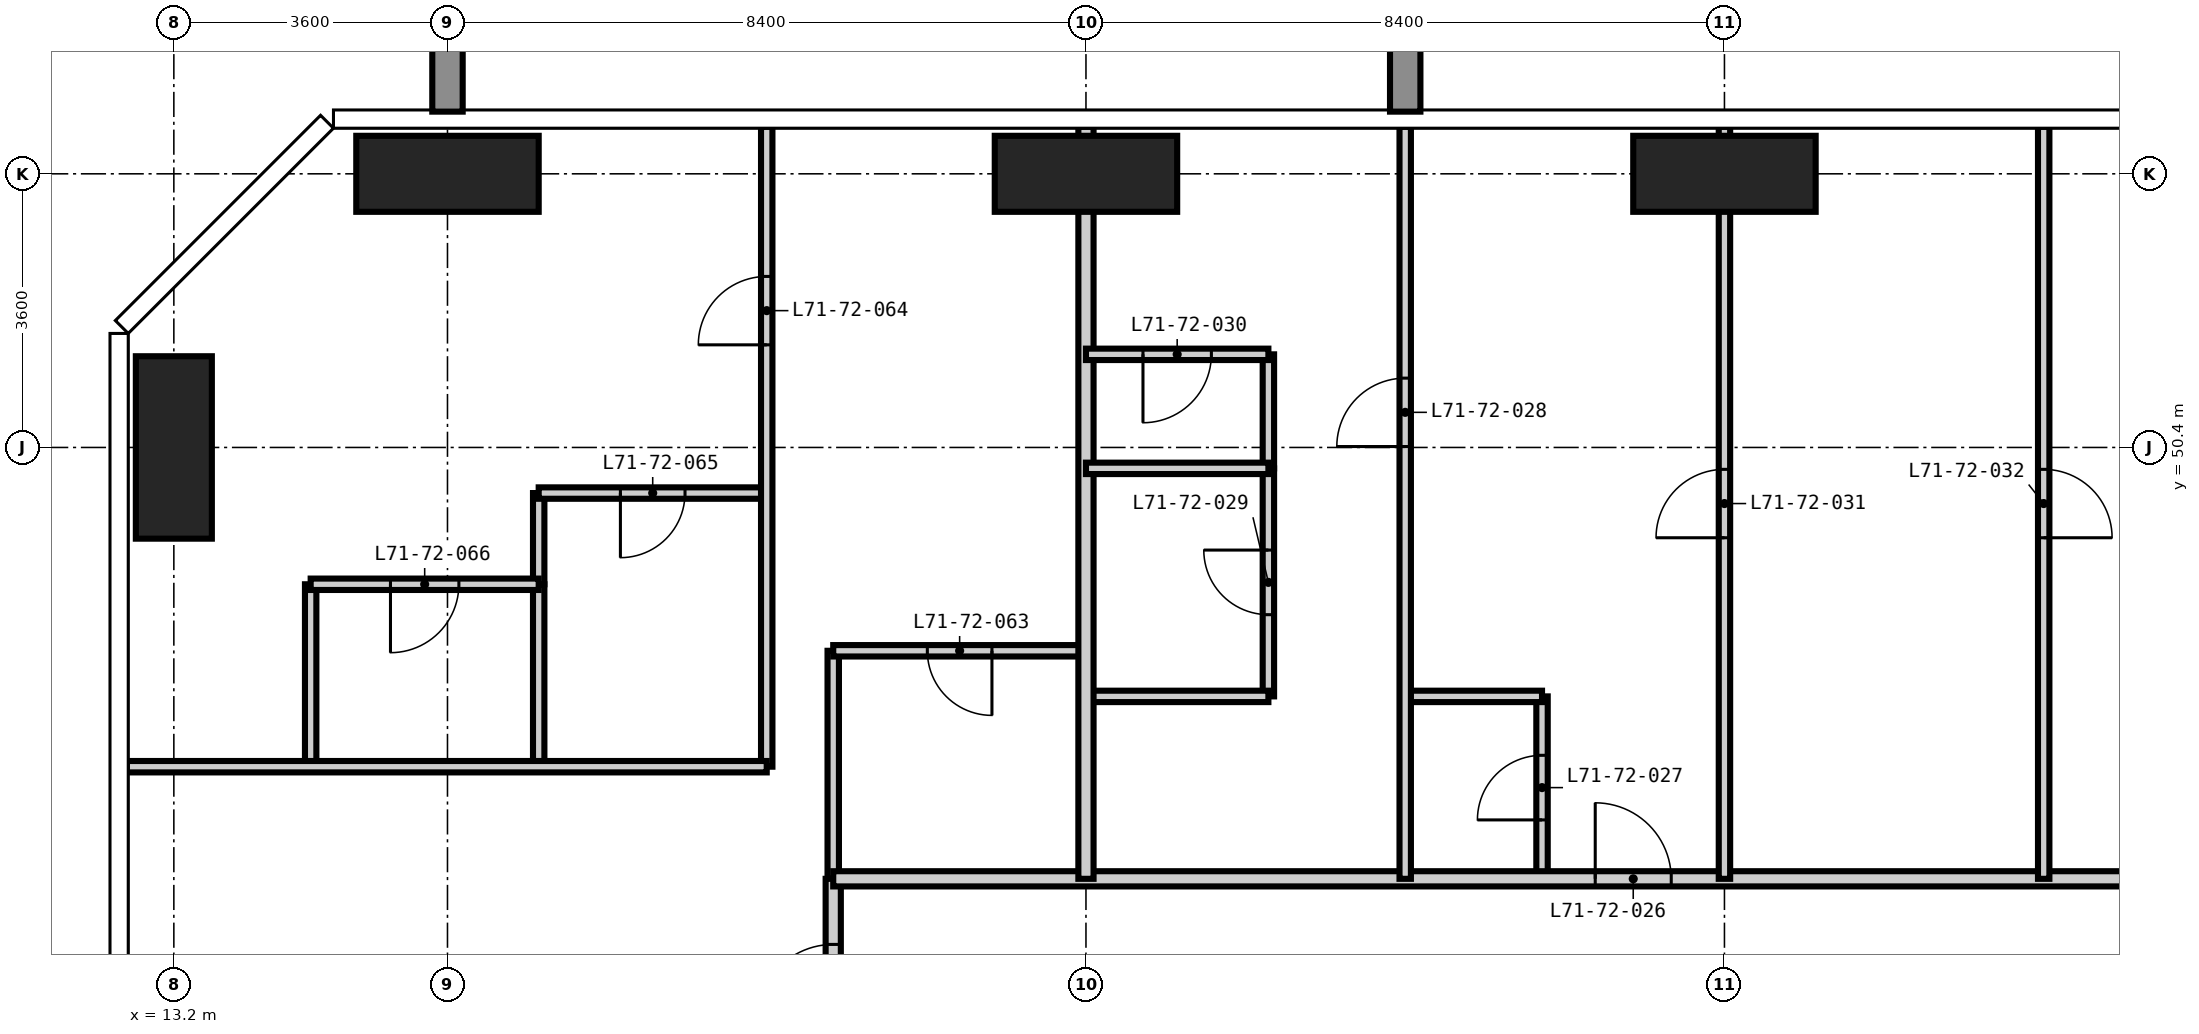
"""IFC4 building model, lengths in metres.
Left out: names, types, materials, properties, quantities, classifications, styles, units other than length and angle.
Written with IfcOpenShell. Run it as: python <this file> out.ifc"""

import sys

from ifc_helpers import new_model, si_unit, direction, frame, frame_2d, origin, origin_2d, place, context, subcontext, project, spatial, rectangle, extrude, element, fill, save


model = new_model("IFC4")
c1 = context("Model", 3, precision=1e-05, world=origin(), true_north=direction((0.0, 1.0)))
c2 = subcontext(c1, "Body", "Model", "MODEL_VIEW")
j1 = project(units=[si_unit("LENGTHUNIT", "METRE"), si_unit("PLANEANGLEUNIT", "RADIAN")], contexts=[c1])
p1 = place(None, origin())
s1 = spatial("IfcSite", under=j1, at=p1, CompositionType="ELEMENT")
p2 = place(p1, origin())
s2 = spatial("IfcBuilding", under=s1, at=p2, CompositionType="ELEMENT")
p3 = place(p2, frame((0.0, 0.0, 276.3)))
s3 = spatial("IfcBuildingStorey", under=s2, at=p3, CompositionType="ELEMENT", Elevation=276.3)
p4 = place(p3, frame((13.2, 50.4, -0.35), z_axis=(0.0, 0.0, 1.0), x_axis=(1.0, 0.0, 0.0)))
e1 = element("IfcColumn", 1, at=p4, inside=s3, PredefinedType="COLUMN", context=c2, shape_type="SweptSolid", body=[
    extrude(rectangle(XDim=1.0, YDim=2.4, at=origin_2d()), origin(), (0.0, 0.0, 1.0), 3.9),
])
for number, where, z_axis, x_axis in (
    (2, (16.8, 54.0, -0.35), (0.0, 0.0, 1.0), (1.0, 0.0, 0.0)),
    (3, (25.2, 54.0, -0.35), (0.0, 0.0, 1.0), (1.0, 0.0, 0.0)),
    (4, (33.6, 54.0, -0.35), (0.0, 0.0, 1.0), (1.0, 0.0, 0.0)),
):
    element("IfcColumn", number, at=place(p3, frame(where, z_axis=z_axis, x_axis=x_axis)), inside=s3, PredefinedType="COLUMN", context=c2, shape_type="SweptSolid", body=[
        extrude(rectangle(XDim=2.4, YDim=1.0, at=origin_2d()), origin(), (0.0, 0.0, 1.0), 3.9),
    ])
p5 = place(p3, frame((18.0, 48.6, 0.0), z_axis=(0.0, 0.0, 1.0), x_axis=(0.0, 1.0, 0.0)))
e5 = element("IfcWall", 5, at=p5, inside=s3, PredefinedType="PARTITIONING", context=c2, shape_type="SweptSolid", body=[
    extrude(rectangle(XDim=1.2, YDim=0.15, at=frame_2d((0.6, 0.0))), origin(), (0.0, 0.0, 1.0), 3.55),
])
p6 = place(p3, frame((21.875, 44.725, 0.0), z_axis=(0.0, 0.0, 1.0), x_axis=(0.0, 1.0, 0.0)))
e6 = element("IfcWall", 6, at=p6, inside=s3, PredefinedType="PARTITIONING", context=c2, shape_type="SweptSolid", body=[
    extrude(rectangle(XDim=3.0, YDim=0.15, at=frame_2d((1.5, 0.0))), origin(), (0.0, 0.0, 1.0), 3.55),
])
p7 = place(p3, frame((27.6, 47.125, 0.0), z_axis=(0.0, 0.0, 1.0), x_axis=(0.0, 1.0, 0.0)))
e7 = element("IfcWall", 7, at=p7, inside=s3, PredefinedType="PARTITIONING", context=c2, shape_type="SweptSolid", body=[
    extrude(rectangle(XDim=3.0, YDim=0.15, at=frame_2d((1.5, 0.0))), origin(), (0.0, 0.0, 1.0), 3.55),
])
p8 = place(p7, frame((1.075, 0.0, 0.0)))
e8 = element("IfcOpeningElement", 8, at=p8, cuts=e7, PredefinedType="OPENING", context=c2, shape_type="SweptSolid", body=[
    extrude(rectangle(XDim=0.85, YDim=2.1, at=frame_2d((0.425, 1.05))), frame((0.0, 0.085, 0.0), z_axis=(0.0, -1.0, 0.0), x_axis=(1.0, 0.0, 0.0)), (0.0, 0.0, 1.0), 0.17),
])
p9 = place(p3, frame((31.2, 44.725, 0.0), z_axis=(0.0, 0.0, 1.0), x_axis=(0.0, 1.0, 0.0)))
e9 = element("IfcWall", 9, at=p9, inside=s3, PredefinedType="PARTITIONING", context=c2, shape_type="SweptSolid", body=[
    extrude(rectangle(XDim=2.4, YDim=0.15, at=frame_2d((1.2, 0.0))), origin(), (0.0, 0.0, 1.0), 3.55),
])
p10 = place(p9, frame((0.775, 0.0, 0.0)))
e10 = element("IfcOpeningElement", 10, at=p10, cuts=e9, PredefinedType="OPENING", context=c2, shape_type="SweptSolid", body=[
    extrude(rectangle(XDim=0.85, YDim=2.1, at=frame_2d((0.425, 1.05))), frame((0.0, 0.085, 0.0), z_axis=(0.0, -1.0, 0.0), x_axis=(1.0, 0.0, 0.0)), (0.0, 0.0, 1.0), 0.17),
])
p11 = place(p3, frame((25.2, 47.125, 0.0), z_axis=(0.0, 0.0, 1.0), x_axis=(1.0, 0.0, 0.0)))
e11 = element("IfcWall", 11, at=p11, inside=s3, PredefinedType="PARTITIONING", context=c2, shape_type="SweptSolid", body=[
    extrude(rectangle(XDim=2.4, YDim=0.15, at=frame_2d((1.2, 0.0))), origin(), (0.0, 0.0, 1.0), 3.55),
])
p12 = place(p3, frame((29.4, 47.125, 0.0), z_axis=(0.0, 0.0, 1.0), x_axis=(1.0, 0.0, 0.0)))
e12 = element("IfcWall", 12, at=p12, inside=s3, PredefinedType="PARTITIONING", context=c2, shape_type="SweptSolid", body=[
    extrude(rectangle(XDim=1.8, YDim=0.15, at=frame_2d((0.9, 0.0))), origin(), (0.0, 0.0, 1.0), 3.55),
])
p13 = place(p3, frame((21.875, 47.725, 0.0), z_axis=(0.0, 0.0, 1.0), x_axis=(1.0, 0.0, 0.0)))
e13 = element("IfcWall", 13, at=p13, inside=s3, PredefinedType="PARTITIONING", context=c2, shape_type="SweptSolid", body=[
    extrude(rectangle(XDim=3.325, YDim=0.15, at=frame_2d((1.663, 0.0))), origin(), (0.0, 0.0, 1.0), 3.55),
])
p14 = place(p13, frame((1.238, 0.0, 0.0)))
e14 = element("IfcOpeningElement", 14, at=p14, cuts=e13, PredefinedType="OPENING", context=c2, shape_type="SweptSolid", body=[
    extrude(rectangle(XDim=0.85, YDim=2.1, at=frame_2d((0.425, 1.05))), frame((0.0, 0.085, 0.0), z_axis=(0.0, -1.0, 0.0), x_axis=(1.0, 0.0, 0.0)), (0.0, 0.0, 1.0), 0.17),
])
p15 = place(p3, frame((18.0, 49.8, 0.0), z_axis=(0.0, 0.0, 1.0), x_axis=(1.0, 0.0, 0.0)))
e15 = element("IfcWall", 15, at=p15, inside=s3, PredefinedType="PARTITIONING", context=c2, shape_type="SweptSolid", body=[
    extrude(rectangle(XDim=3.0, YDim=0.15, at=frame_2d((1.5, 0.0))), origin(), (0.0, 0.0, 1.0), 3.55),
])
p16 = place(p15, frame((1.075, 0.0, 0.0)))
e16 = element("IfcOpeningElement", 16, at=p16, cuts=e15, PredefinedType="OPENING", context=c2, shape_type="SweptSolid", body=[
    extrude(rectangle(XDim=0.85, YDim=2.1, at=frame_2d((0.425, 1.05))), frame((0.0, 0.085, 0.0), z_axis=(0.0, -1.0, 0.0), x_axis=(1.0, 0.0, 0.0)), (0.0, 0.0, 1.0), 0.17),
])
p17 = place(p3, frame((21.875, 13.475, 0.0), z_axis=(0.0, 0.0, 1.0), x_axis=(0.0, 1.0, 0.0)))
e17 = element("IfcWall", 17, at=p17, inside=s3, PredefinedType="PARTITIONING", context=c2, shape_type="SweptSolid", body=[
    extrude(rectangle(XDim=31.25, YDim=0.2, at=frame_2d((15.625, 0.0))), origin(), (0.0, 0.0, 1.0), 3.55),
])
p18 = place(p17, frame((4.925, 0.0, 0.0)))
e18 = element("IfcOpeningElement", 18, at=p18, cuts=e17, PredefinedType="OPENING", context=c2, shape_type="SweptSolid", body=[
    extrude(rectangle(XDim=1.0, YDim=2.2, at=frame_2d((0.5, 1.1))), frame((0.0, 0.11, 0.0), z_axis=(0.0, -1.0, 0.0), x_axis=(1.0, 0.0, 0.0)), (0.0, 0.0, 1.0), 0.22),
])
p19 = place(p17, frame((11.225, 0.0, 0.0)))
e19 = element("IfcOpeningElement", 19, at=p19, cuts=e17, PredefinedType="OPENING", context=c2, shape_type="SweptSolid", body=[
    extrude(rectangle(XDim=1.0, YDim=2.2, at=frame_2d((0.5, 1.1))), frame((0.0, 0.11, 0.0), z_axis=(0.0, -1.0, 0.0), x_axis=(1.0, 0.0, 0.0)), (0.0, 0.0, 1.0), 0.22),
])
p20 = place(p17, frame((19.625, 0.0, 0.0)))
e20 = element("IfcOpeningElement", 20, at=p20, cuts=e17, PredefinedType="OPENING", context=c2, shape_type="SweptSolid", body=[
    extrude(rectangle(XDim=1.0, YDim=2.2, at=frame_2d((0.5, 1.1))), frame((0.0, 0.11, 0.0), z_axis=(0.0, -1.0, 0.0), x_axis=(1.0, 0.0, 0.0)), (0.0, 0.0, 1.0), 0.22),
])
p21 = place(p17, frame((25.925, 0.0, 0.0)))
e21 = element("IfcOpeningElement", 21, at=p21, cuts=e17, PredefinedType="OPENING", context=c2, shape_type="SweptSolid", body=[
    extrude(rectangle(XDim=1.0, YDim=2.2, at=frame_2d((0.5, 1.1))), frame((0.0, 0.11, 0.0), z_axis=(0.0, -1.0, 0.0), x_axis=(1.0, 0.0, 0.0)), (0.0, 0.0, 1.0), 0.22),
])
p22 = place(p17, frame((1.162, 0.0, 0.0)))
e22 = element("IfcOpeningElement", 22, at=p22, cuts=e17, PredefinedType="OPENING", context=c2, shape_type="SweptSolid", body=[
    extrude(rectangle(XDim=1.0, YDim=2.2, at=frame_2d((0.5, 1.1))), frame((0.0, 0.11, 0.0), z_axis=(0.0, -1.0, 0.0), x_axis=(1.0, 0.0, 0.0)), (0.0, 0.0, 1.0), 0.22),
])
p23 = place(p17, frame((29.387, 0.0, 0.0)))
e23 = element("IfcOpeningElement", 23, at=p23, cuts=e17, PredefinedType="OPENING", context=c2, shape_type="SweptSolid", body=[
    extrude(rectangle(XDim=1.0, YDim=2.2, at=frame_2d((0.5, 1.1))), frame((0.0, 0.11, 0.0), z_axis=(0.0, -1.0, 0.0), x_axis=(1.0, 0.0, 0.0)), (0.0, 0.0, 1.0), 0.22),
])
p24 = place(p3, frame((21.875, 44.725, 0.0), z_axis=(0.0, 0.0, 1.0), x_axis=(1.0, 0.0, 0.0)))
e24 = element("IfcWall", 24, at=p24, inside=s3, PredefinedType="PARTITIONING", context=c2, shape_type="SweptSolid", body=[
    extrude(rectangle(XDim=22.25, YDim=0.2, at=frame_2d((11.125, 0.0))), origin(), (0.0, 0.0, 1.0), 3.55),
])
p25 = place(p24, frame((10.025, 0.0, 0.0)))
e25 = element("IfcOpeningElement", 25, at=p25, cuts=e24, PredefinedType="OPENING", context=c2, shape_type="SweptSolid", body=[
    extrude(rectangle(XDim=1.0, YDim=2.2, at=frame_2d((0.5, 1.1))), frame((0.0, 0.11, 0.0), z_axis=(0.0, -1.0, 0.0), x_axis=(1.0, 0.0, 0.0)), (0.0, 0.0, 1.0), 0.22),
])
p26 = place(p3, frame((25.2, 44.725, 0.0), z_axis=(0.0, 0.0, 1.0), x_axis=(0.0, 1.0, 0.0)))
e26 = element("IfcWall", 26, at=p26, inside=s3, PredefinedType="PARTITIONING", context=c2, shape_type="SweptSolid", body=[
    extrude(rectangle(XDim=9.893, YDim=0.2, at=frame_2d((4.946, 0.0))), origin(), (0.0, 0.0, 1.0), 3.55),
])
for number, where, z_axis, x_axis in (
    (27, (15.0, 46.2, 0.0), (0.0, 0.0, 1.0), (0.0, 1.0, 0.0)),
    (28, (18.0, 46.2, 0.0), (0.0, 0.0, 1.0), (0.0, 1.0, 0.0)),
):
    element("IfcWall", number, at=place(p3, frame(where, z_axis=z_axis, x_axis=x_axis)), inside=s3, PredefinedType="PARTITIONING", context=c2, shape_type="SweptSolid", body=[
        extrude(rectangle(XDim=2.4, YDim=0.15, at=frame_2d((1.2, 0.0))), origin(), (0.0, 0.0, 1.0), 3.55),
    ])
p27 = place(p3, frame((21.0, 46.2, 0.0), z_axis=(0.0, 0.0, 1.0), x_axis=(0.0, 1.0, 0.0)))
e29 = element("IfcWall", 29, at=p27, inside=s3, PredefinedType="PARTITIONING", context=c2, shape_type="SweptSolid", body=[
    extrude(rectangle(XDim=8.418, YDim=0.15, at=frame_2d((4.209, 0.0))), origin(), (0.0, 0.0, 1.0), 3.55),
])
p28 = place(p27, frame((5.55, 0.0, 0.0)))
e30 = element("IfcOpeningElement", 30, at=p28, cuts=e29, PredefinedType="OPENING", context=c2, shape_type="SweptSolid", body=[
    extrude(rectangle(XDim=0.9, YDim=2.1, at=frame_2d((0.45, 1.05))), frame((0.0, 0.085, 0.0), z_axis=(0.0, -1.0, 0.0), x_axis=(1.0, 0.0, 0.0)), (0.0, 0.0, 1.0), 0.17),
])
p29 = place(p3, frame((27.6, 50.125, 0.0), z_axis=(0.0, 0.0, 1.0), x_axis=(0.0, 1.0, 0.0)))
e31 = element("IfcWall", 31, at=p29, inside=s3, PredefinedType="PARTITIONING", context=c2, shape_type="SweptSolid", body=[
    extrude(rectangle(XDim=1.5, YDim=0.15, at=frame_2d((0.75, 0.0))), origin(), (0.0, 0.0, 1.0), 3.55),
])
p30 = place(p3, frame((29.4, 44.725, 0.0), z_axis=(0.0, 0.0, 1.0), x_axis=(0.0, 1.0, 0.0)))
e32 = element("IfcWall", 32, at=p30, inside=s3, PredefinedType="PARTITIONING", context=c2, shape_type="SweptSolid", body=[
    extrude(rectangle(XDim=9.893, YDim=0.15, at=frame_2d((4.946, 0.0))), origin(), (0.0, 0.0, 1.0), 3.55),
])
p31 = place(p30, frame((5.687, 0.0, 0.0)))
e33 = element("IfcOpeningElement", 33, at=p31, cuts=e32, PredefinedType="OPENING", context=c2, shape_type="SweptSolid", body=[
    extrude(rectangle(XDim=0.9, YDim=2.1, at=frame_2d((0.45, 1.05))), frame((0.0, 0.085, 0.0), z_axis=(0.0, -1.0, 0.0), x_axis=(1.0, 0.0, 0.0)), (0.0, 0.0, 1.0), 0.17),
])
p32 = place(p3, frame((33.6, 44.725, 0.0), z_axis=(0.0, 0.0, 1.0), x_axis=(0.0, 1.0, 0.0)))
e34 = element("IfcWall", 34, at=p32, inside=s3, PredefinedType="PARTITIONING", context=c2, shape_type="SweptSolid", body=[
    extrude(rectangle(XDim=9.893, YDim=0.15, at=frame_2d((4.946, 0.0))), origin(), (0.0, 0.0, 1.0), 3.55),
])
p33 = place(p32, frame((4.487, 0.0, 0.0)))
e35 = element("IfcOpeningElement", 35, at=p33, cuts=e34, PredefinedType="OPENING", context=c2, shape_type="SweptSolid", body=[
    extrude(rectangle(XDim=0.9, YDim=2.1, at=frame_2d((0.45, 1.05))), frame((0.0, 0.085, 0.0), z_axis=(0.0, -1.0, 0.0), x_axis=(1.0, 0.0, 0.0)), (0.0, 0.0, 1.0), 0.17),
])
p34 = place(p3, frame((37.8, 44.725, 0.0), z_axis=(0.0, 0.0, 1.0), x_axis=(0.0, 1.0, 0.0)))
e36 = element("IfcWall", 36, at=p34, inside=s3, PredefinedType="PARTITIONING", context=c2, shape_type="SweptSolid", body=[
    extrude(rectangle(XDim=9.893, YDim=0.15, at=frame_2d((4.946, 0.0))), origin(), (0.0, 0.0, 1.0), 3.55),
])
p35 = place(p34, frame((4.487, 0.0, 0.0)))
e37 = element("IfcOpeningElement", 37, at=p35, cuts=e36, PredefinedType="OPENING", context=c2, shape_type="SweptSolid", body=[
    extrude(rectangle(XDim=0.9, YDim=2.1, at=frame_2d((0.45, 1.05))), frame((0.0, 0.085, 0.0), z_axis=(0.0, -1.0, 0.0), x_axis=(1.0, 0.0, 0.0)), (0.0, 0.0, 1.0), 0.17),
])
p36 = place(p3, frame((12.582, 46.2, 0.0), z_axis=(0.0, 0.0, 1.0), x_axis=(1.0, 0.0, 0.0)))
e38 = element("IfcWall", 38, at=p36, inside=s3, PredefinedType="PARTITIONING", context=c2, shape_type="SweptSolid", body=[
    extrude(rectangle(XDim=8.418, YDim=0.15, at=frame_2d((4.209, 0.0))), origin(), (0.0, 0.0, 1.0), 3.55),
])
p37 = place(p3, frame((15.0, 48.6, 0.0), z_axis=(0.0, 0.0, 1.0), x_axis=(1.0, 0.0, 0.0)))
e39 = element("IfcWall", 39, at=p37, inside=s3, PredefinedType="PARTITIONING", context=c2, shape_type="SweptSolid", body=[
    extrude(rectangle(XDim=3.0, YDim=0.15, at=frame_2d((1.5, 0.0))), origin(), (0.0, 0.0, 1.0), 3.55),
])
p38 = place(p37, frame((1.05, 0.0, 0.0)))
e40 = element("IfcOpeningElement", 40, at=p38, cuts=e39, PredefinedType="OPENING", context=c2, shape_type="SweptSolid", body=[
    extrude(rectangle(XDim=0.9, YDim=2.1, at=frame_2d((0.45, 1.05))), frame((0.0, 0.085, 0.0), z_axis=(0.0, -1.0, 0.0), x_axis=(1.0, 0.0, 0.0)), (0.0, 0.0, 1.0), 0.17),
])
p39 = place(p3, frame((25.2, 50.125, 0.0), z_axis=(0.0, 0.0, 1.0), x_axis=(1.0, 0.0, 0.0)))
e41 = element("IfcWall", 41, at=p39, inside=s3, PredefinedType="PARTITIONING", context=c2, shape_type="SweptSolid", body=[
    extrude(rectangle(XDim=2.4, YDim=0.15, at=frame_2d((1.2, 0.0))), origin(), (0.0, 0.0, 1.0), 3.55),
])
p40 = place(p3, frame((25.2, 51.625, 0.0), z_axis=(0.0, 0.0, 1.0), x_axis=(1.0, 0.0, 0.0)))
e42 = element("IfcWall", 42, at=p40, inside=s3, PredefinedType="PARTITIONING", context=c2, shape_type="SweptSolid", body=[
    extrude(rectangle(XDim=2.4, YDim=0.15, at=frame_2d((1.2, 0.0))), origin(), (0.0, 0.0, 1.0), 3.55),
])
p41 = place(p40, frame((0.75, 0.0, 0.0)))
e43 = element("IfcOpeningElement", 43, at=p41, cuts=e42, PredefinedType="OPENING", context=c2, shape_type="SweptSolid", body=[
    extrude(rectangle(XDim=0.9, YDim=2.1, at=frame_2d((0.45, 1.05))), frame((0.0, 0.085, 0.0), z_axis=(0.0, -1.0, 0.0), x_axis=(1.0, 0.0, 0.0)), (0.0, 0.0, 1.0), 0.17),
])
p42 = place(p25, origin())
e44 = element("IfcDoor", 44, at=p42, inside=s3, OperationType="SINGLE_SWING_LEFT", PredefinedType="DOOR", context=c2, shape_type="SweptSolid", body=[
    extrude(rectangle(XDim=1.0, YDim=2.2, at=frame_2d((0.5, 1.1))), frame((0.0, 0.025, 0.0), z_axis=(0.0, -1.0, 0.0), x_axis=(1.0, 0.0, 0.0)), (0.0, 0.0, 1.0), 0.05),
])
fill(e25, e44)
p43 = place(p10, origin())
e45 = element("IfcDoor", 45, at=p43, inside=s3, OperationType="SINGLE_SWING_LEFT", PredefinedType="DOOR", context=c2, shape_type="SweptSolid", body=[
    extrude(rectangle(XDim=0.85, YDim=2.1, at=frame_2d((0.425, 1.05))), frame((0.0, 0.025, 0.0), z_axis=(0.0, -1.0, 0.0), x_axis=(1.0, 0.0, 0.0)), (0.0, 0.0, 1.0), 0.05),
])
fill(e10, e45)
p44 = place(p31, origin())
e46 = element("IfcDoor", 46, at=p44, inside=s3, OperationType="SINGLE_SWING_LEFT", PredefinedType="DOOR", context=c2, shape_type="SweptSolid", body=[
    extrude(rectangle(XDim=0.9, YDim=2.1, at=frame_2d((0.45, 1.05))), frame((0.0, 0.025, 0.0), z_axis=(0.0, -1.0, 0.0), x_axis=(1.0, 0.0, 0.0)), (0.0, 0.0, 1.0), 0.05),
])
fill(e33, e46)
p45 = place(p8, origin())
e47 = element("IfcDoor", 47, at=p45, inside=s3, OperationType="SINGLE_SWING_RIGHT", PredefinedType="DOOR", context=c2, shape_type="SweptSolid", body=[
    extrude(rectangle(XDim=0.85, YDim=2.1, at=frame_2d((0.425, 1.05))), frame((0.0, 0.025, 0.0), z_axis=(0.0, -1.0, 0.0), x_axis=(1.0, 0.0, 0.0)), (0.0, 0.0, 1.0), 0.05),
])
fill(e8, e47)
p46 = place(p41, frame((0.9, 0.0, 0.0), z_axis=(0.0, 0.0, 1.0), x_axis=(-1.0, 0.0, 0.0)))
e48 = element("IfcDoor", 48, at=p46, inside=s3, OperationType="SINGLE_SWING_RIGHT", PredefinedType="DOOR", context=c2, shape_type="SweptSolid", body=[
    extrude(rectangle(XDim=0.9, YDim=2.1, at=frame_2d((0.45, 1.05))), frame((0.0, 0.025, 0.0), z_axis=(0.0, -1.0, 0.0), x_axis=(1.0, 0.0, 0.0)), (0.0, 0.0, 1.0), 0.05),
])
fill(e43, e48)
p47 = place(p33, origin())
e49 = element("IfcDoor", 49, at=p47, inside=s3, OperationType="SINGLE_SWING_LEFT", PredefinedType="DOOR", context=c2, shape_type="SweptSolid", body=[
    extrude(rectangle(XDim=0.9, YDim=2.1, at=frame_2d((0.45, 1.05))), frame((0.0, 0.025, 0.0), z_axis=(0.0, -1.0, 0.0), x_axis=(1.0, 0.0, 0.0)), (0.0, 0.0, 1.0), 0.05),
])
fill(e35, e49)
p48 = place(p35, frame((0.9, 0.0, 0.0), z_axis=(0.0, 0.0, 1.0), x_axis=(-1.0, 0.0, 0.0)))
e50 = element("IfcDoor", 50, at=p48, inside=s3, OperationType="SINGLE_SWING_RIGHT", PredefinedType="DOOR", context=c2, shape_type="SweptSolid", body=[
    extrude(rectangle(XDim=0.9, YDim=2.1, at=frame_2d((0.45, 1.05))), frame((0.0, 0.025, 0.0), z_axis=(0.0, -1.0, 0.0), x_axis=(1.0, 0.0, 0.0)), (0.0, 0.0, 1.0), 0.05),
])
fill(e37, e50)
p49 = place(p23, origin())
e51 = element("IfcDoor", 51, at=p49, inside=s3, OperationType="SINGLE_SWING_LEFT", PredefinedType="DOOR", context=c2, shape_type="SweptSolid", body=[
    extrude(rectangle(XDim=1.0, YDim=2.2, at=frame_2d((0.5, 1.1))), frame((0.0, 0.025, 0.0), z_axis=(0.0, -1.0, 0.0), x_axis=(1.0, 0.0, 0.0)), (0.0, 0.0, 1.0), 0.05),
])
fill(e23, e51)
p50 = place(p14, frame((0.85, 0.0, 0.0), z_axis=(0.0, 0.0, 1.0), x_axis=(-1.0, 0.0, 0.0)))
e52 = element("IfcDoor", 52, at=p50, inside=s3, OperationType="SINGLE_SWING_LEFT", PredefinedType="DOOR", context=c2, shape_type="SweptSolid", body=[
    extrude(rectangle(XDim=0.85, YDim=2.1, at=frame_2d((0.425, 1.05))), frame((0.0, 0.025, 0.0), z_axis=(0.0, -1.0, 0.0), x_axis=(1.0, 0.0, 0.0)), (0.0, 0.0, 1.0), 0.05),
])
fill(e14, e52)
p51 = place(p28, origin())
e53 = element("IfcDoor", 53, at=p51, inside=s3, OperationType="SINGLE_SWING_LEFT", PredefinedType="DOOR", context=c2, shape_type="SweptSolid", body=[
    extrude(rectangle(XDim=0.9, YDim=2.1, at=frame_2d((0.45, 1.05))), frame((0.0, 0.025, 0.0), z_axis=(0.0, -1.0, 0.0), x_axis=(1.0, 0.0, 0.0)), (0.0, 0.0, 1.0), 0.05),
])
fill(e30, e53)
p52 = place(p16, frame((0.85, 0.0, 0.0), z_axis=(0.0, 0.0, 1.0), x_axis=(-1.0, 0.0, 0.0)))
e54 = element("IfcDoor", 54, at=p52, inside=s3, OperationType="SINGLE_SWING_RIGHT", PredefinedType="DOOR", context=c2, shape_type="SweptSolid", body=[
    extrude(rectangle(XDim=0.85, YDim=2.1, at=frame_2d((0.425, 1.05))), frame((0.0, 0.025, 0.0), z_axis=(0.0, -1.0, 0.0), x_axis=(1.0, 0.0, 0.0)), (0.0, 0.0, 1.0), 0.05),
])
fill(e16, e54)
p53 = place(p38, frame((0.9, 0.0, 0.0), z_axis=(0.0, 0.0, 1.0), x_axis=(-1.0, 0.0, 0.0)))
e55 = element("IfcDoor", 55, at=p53, inside=s3, OperationType="SINGLE_SWING_RIGHT", PredefinedType="DOOR", context=c2, shape_type="SweptSolid", body=[
    extrude(rectangle(XDim=0.9, YDim=2.1, at=frame_2d((0.45, 1.05))), frame((0.0, 0.025, 0.0), z_axis=(0.0, -1.0, 0.0), x_axis=(1.0, 0.0, 0.0)), (0.0, 0.0, 1.0), 0.05),
])
fill(e40, e55)
save(model, sys.argv[1])
